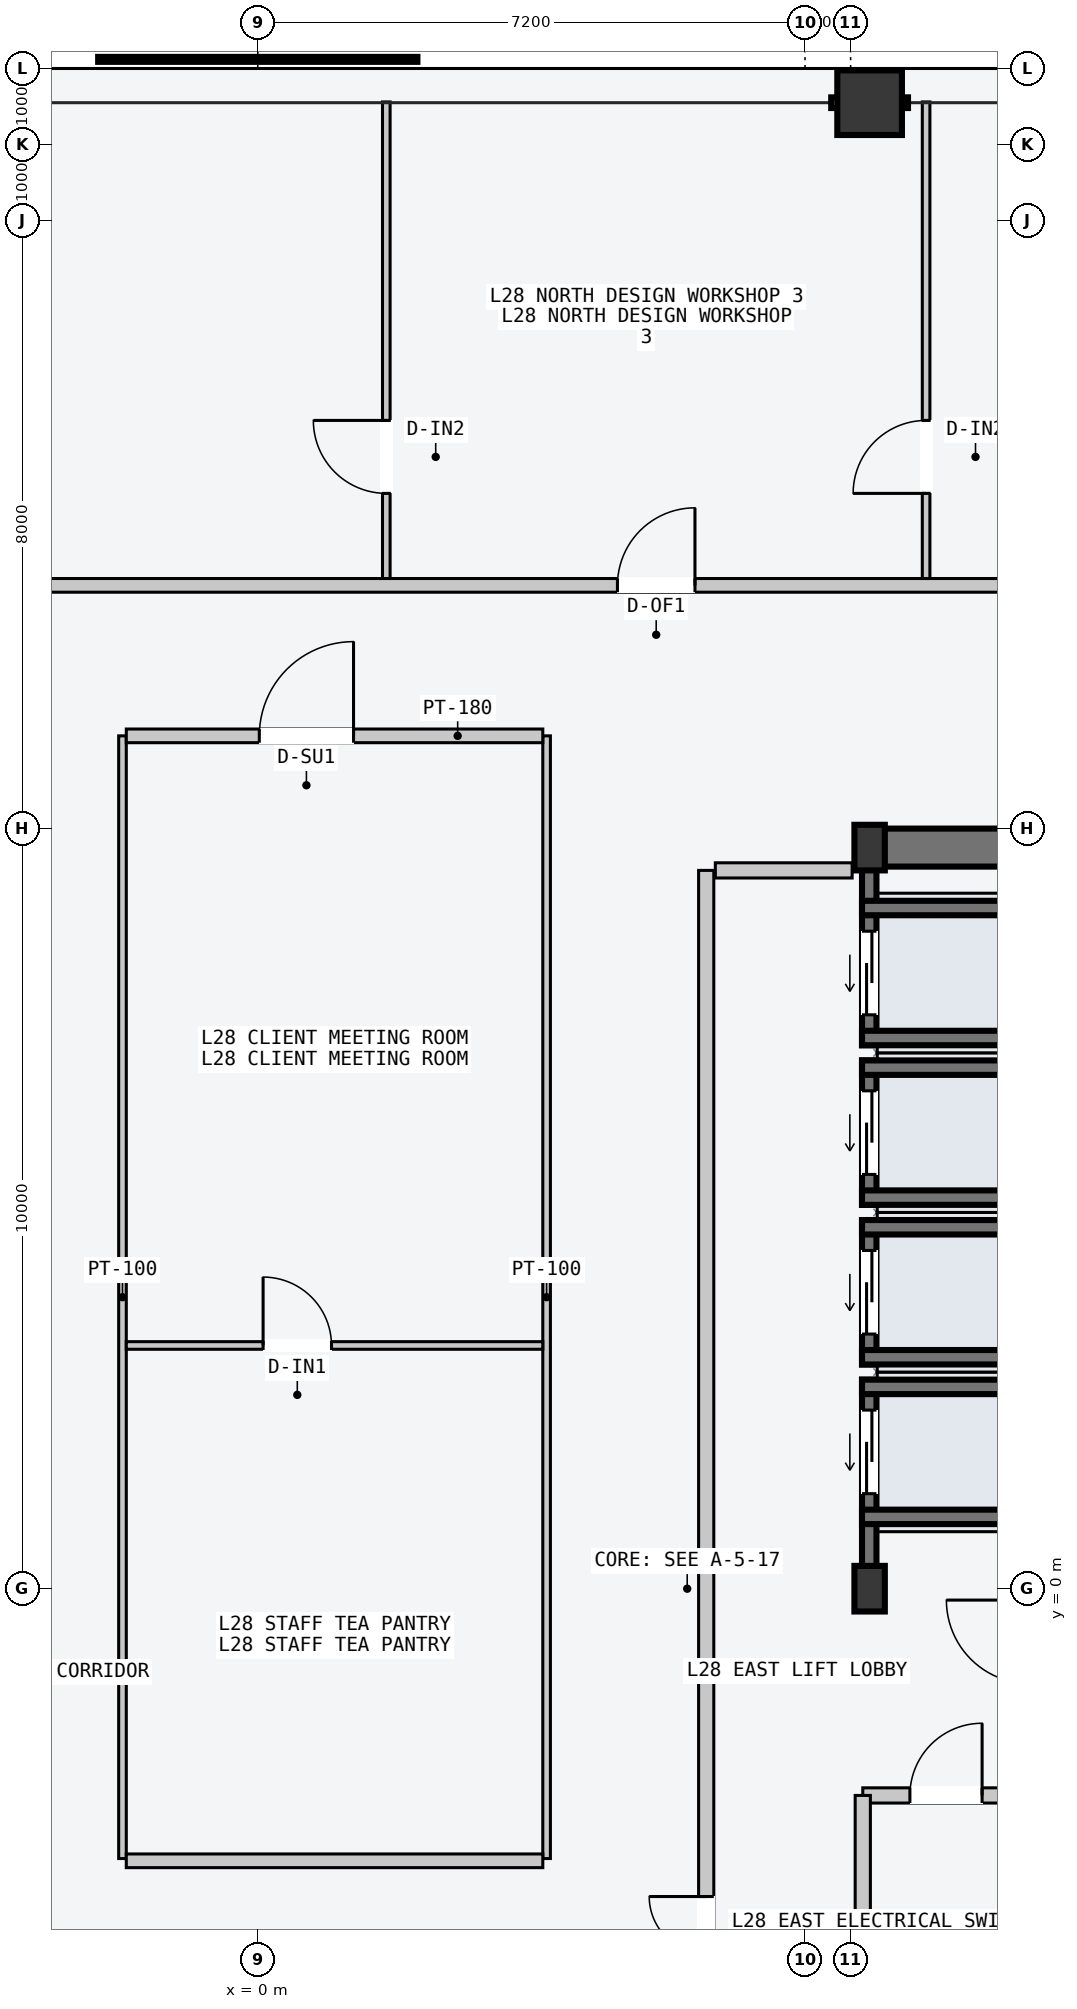
"""IFC4 building model, lengths in metres.
Left out: names, types, materials, properties, quantities, classifications, styles, units other than length and angle.
Written with IfcOpenShell. Run it as: python <this file> out.ifc"""

import sys

from ifc_helpers import new_model, si_unit, direction, frame, frame_2d, origin, origin_2d, place, context, subcontext, project, spatial, rectangle, hollow_rectangle, i_section, extrude, element, fill, save


model = new_model("IFC4")
c1 = context("Model", 3, precision=1e-05, world=origin(), true_north=direction((0.0, 1.0)))
c2 = subcontext(c1, "Body", "Model", "MODEL_VIEW")
j1 = project(units=[si_unit("LENGTHUNIT", "METRE"), si_unit("PLANEANGLEUNIT", "RADIAN")], contexts=[c1])
p1 = place(None, origin())
s1 = spatial("IfcSite", under=j1, at=p1, CompositionType="ELEMENT")
p2 = place(p1, origin())
s2 = spatial("IfcBuilding", under=s1, at=p2, CompositionType="ELEMENT")
p3 = place(p2, frame((0.0, 0.0, 109.8)))
s3 = spatial("IfcBuildingStorey", under=s2, at=p3, CompositionType="ELEMENT", Elevation=109.8)
p4 = place(p3, frame((8.07, 9.75, -0.2), z_axis=(0.0, 0.0, 1.0), x_axis=(1.0, 0.0, 0.0)))
e1 = element("IfcWall", 1, at=p4, inside=s3, PredefinedType="SHEAR", context=c2, shape_type="SweptSolid", body=[
    extrude(rectangle(XDim=6.46, YDim=0.5, at=frame_2d((3.23, 0.0))), origin(), (0.0, 0.0, 1.0), 3.6),
])
for number, where, z_axis, x_axis in (
    (2, (8.05, 0.0, 0.0), (0.0, 0.0, 1.0), (1.0, 0.0, 0.0)),
    (3, (8.05, 9.75, 0.0), (0.0, 0.0, 1.0), (1.0, 0.0, 0.0)),
):
    element("IfcColumn", number, at=place(p3, frame(where, z_axis=z_axis, x_axis=x_axis)), inside=s3, PredefinedType="COLUMN", context=c2, shape_type="SweptSolid", body=[
        extrude(i_section(OverallWidth=0.4, OverallDepth=0.6, WebThickness=0.022, FlangeThickness=0.036, at=origin_2d()), origin(), (0.0, 0.0, 1.0), 3.6),
    ])
p5 = place(p3, frame((8.05, 19.55, 0.0), z_axis=(0.0, 0.0, 1.0), x_axis=(1.0, 0.0, 0.0)))
e4 = element("IfcColumn", 4, at=p5, inside=s3, PredefinedType="COLUMN", context=c2, shape_type="SweptSolid", body=[
    extrude(hollow_rectangle(XDim=0.85, YDim=0.85, WallThickness=0.04, at=origin_2d()), origin(), (0.0, 0.0, 1.0), 3.6),
])
p6 = place(p3, frame((8.045, 0.21, -0.2), z_axis=(0.0, 0.0, 1.0), x_axis=(0.0, 1.0, 0.0)))
e5 = element("IfcWall", 5, at=p6, inside=s3, PredefinedType="SOLIDWALL", context=c2, shape_type="SweptSolid", body=[
    extrude(rectangle(XDim=2.54, YDim=0.19, at=frame_2d((1.27, 0.0))), origin(), (0.0, 0.0, 1.0), 3.6),
])
p7 = place(p6, frame((1.04, 0.0, 0.2)))
e6 = element("IfcOpeningElement", 6, at=p7, cuts=e5, PredefinedType="OPENING", context=c2, shape_type="SweptSolid", body=[
    extrude(rectangle(XDim=1.1, YDim=2.2, at=frame_2d((0.55, 1.1))), frame((0.0, 0.105, 0.0), z_axis=(0.0, -1.0, 0.0), x_axis=(1.0, 0.0, 0.0)), (0.0, 0.0, 1.0), 0.21),
])
for number, where, z_axis, x_axis in (
    (7, (7.95, 2.655, -0.2), (0.0, 0.0, 1.0), (1.0, 0.0, 0.0)),
    (8, (7.95, 0.945, -0.2), (0.0, 0.0, 1.0), (1.0, 0.0, 0.0)),
):
    element("IfcWall", number, at=place(p3, frame(where, z_axis=z_axis, x_axis=x_axis)), inside=s3, PredefinedType="SOLIDWALL", context=c2, shape_type="SweptSolid", body=[
        extrude(rectangle(XDim=2.2, YDim=0.19, at=frame_2d((1.1, 0.0))), origin(), (0.0, 0.0, 1.0), 3.6),
    ])
p8 = place(p3, frame((8.045, 2.95, -0.2), z_axis=(0.0, 0.0, 1.0), x_axis=(0.0, 1.0, 0.0)))
e9 = element("IfcWall", 9, at=p8, inside=s3, PredefinedType="SOLIDWALL", context=c2, shape_type="SweptSolid", body=[
    extrude(rectangle(XDim=1.9, YDim=0.19, at=frame_2d((0.95, 0.0))), origin(), (0.0, 0.0, 1.0), 3.6),
])
p9 = place(p8, frame((0.4, 0.0, 0.2)))
e10 = element("IfcOpeningElement", 10, at=p9, cuts=e9, PredefinedType="OPENING", context=c2, shape_type="SweptSolid", body=[
    extrude(rectangle(XDim=1.1, YDim=2.2, at=frame_2d((0.55, 1.1))), frame((0.0, 0.105, 0.0), z_axis=(0.0, -1.0, 0.0), x_axis=(1.0, 0.0, 0.0)), (0.0, 0.0, 1.0), 0.21),
])
for number, where, z_axis, x_axis in (
    (11, (7.95, 4.755, -0.2), (0.0, 0.0, 1.0), (1.0, 0.0, 0.0)),
    (12, (7.95, 3.045, -0.2), (0.0, 0.0, 1.0), (1.0, 0.0, 0.0)),
):
    element("IfcWall", number, at=place(p3, frame(where, z_axis=z_axis, x_axis=x_axis)), inside=s3, PredefinedType="SOLIDWALL", context=c2, shape_type="SweptSolid", body=[
        extrude(rectangle(XDim=2.2, YDim=0.19, at=frame_2d((1.1, 0.0))), origin(), (0.0, 0.0, 1.0), 3.6),
    ])
p10 = place(p3, frame((8.045, 5.05, -0.2), z_axis=(0.0, 0.0, 1.0), x_axis=(0.0, 1.0, 0.0)))
e13 = element("IfcWall", 13, at=p10, inside=s3, PredefinedType="SOLIDWALL", context=c2, shape_type="SweptSolid", body=[
    extrude(rectangle(XDim=1.9, YDim=0.19, at=frame_2d((0.95, 0.0))), origin(), (0.0, 0.0, 1.0), 3.6),
])
p11 = place(p10, frame((0.4, 0.0, 0.2)))
e14 = element("IfcOpeningElement", 14, at=p11, cuts=e13, PredefinedType="OPENING", context=c2, shape_type="SweptSolid", body=[
    extrude(rectangle(XDim=1.1, YDim=2.2, at=frame_2d((0.55, 1.1))), frame((0.0, 0.105, 0.0), z_axis=(0.0, -1.0, 0.0), x_axis=(1.0, 0.0, 0.0)), (0.0, 0.0, 1.0), 0.21),
])
for number, where, z_axis, x_axis in (
    (15, (7.95, 6.855, -0.2), (0.0, 0.0, 1.0), (1.0, 0.0, 0.0)),
    (16, (7.95, 5.145, -0.2), (0.0, 0.0, 1.0), (1.0, 0.0, 0.0)),
):
    element("IfcWall", number, at=place(p3, frame(where, z_axis=z_axis, x_axis=x_axis)), inside=s3, PredefinedType="SOLIDWALL", context=c2, shape_type="SweptSolid", body=[
        extrude(rectangle(XDim=2.2, YDim=0.19, at=frame_2d((1.1, 0.0))), origin(), (0.0, 0.0, 1.0), 3.6),
    ])
p12 = place(p3, frame((8.045, 7.15, -0.2), z_axis=(0.0, 0.0, 1.0), x_axis=(0.0, 1.0, 0.0)))
e17 = element("IfcWall", 17, at=p12, inside=s3, PredefinedType="SOLIDWALL", context=c2, shape_type="SweptSolid", body=[
    extrude(rectangle(XDim=2.37, YDim=0.19, at=frame_2d((1.185, 0.0))), origin(), (0.0, 0.0, 1.0), 3.6),
])
p13 = place(p12, frame((0.4, 0.0, 0.2)))
e18 = element("IfcOpeningElement", 18, at=p13, cuts=e17, PredefinedType="OPENING", context=c2, shape_type="SweptSolid", body=[
    extrude(rectangle(XDim=1.1, YDim=2.2, at=frame_2d((0.55, 1.1))), frame((0.0, 0.105, 0.0), z_axis=(0.0, -1.0, 0.0), x_axis=(1.0, 0.0, 0.0)), (0.0, 0.0, 1.0), 0.21),
])
for number, where, z_axis, x_axis in (
    (19, (7.95, 8.955, -0.2), (0.0, 0.0, 1.0), (1.0, 0.0, 0.0)),
    (20, (7.95, 7.245, -0.2), (0.0, 0.0, 1.0), (1.0, 0.0, 0.0)),
):
    element("IfcWall", number, at=place(p3, frame(where, z_axis=z_axis, x_axis=x_axis)), inside=s3, PredefinedType="SOLIDWALL", context=c2, shape_type="SweptSolid", body=[
        extrude(rectangle(XDim=2.2, YDim=0.19, at=frame_2d((1.1, 0.0))), origin(), (0.0, 0.0, 1.0), 3.6),
    ])
p14 = place(p3, frame((5.9, -9.45, 0.0), z_axis=(0.0, 0.0, 1.0), x_axis=(0.0, 1.0, 0.0)))
e21 = element("IfcWall", 21, at=p14, inside=s3, PredefinedType="PARTITIONING", context=c2, shape_type="SweptSolid", body=[
    extrude(rectangle(XDim=18.9, YDim=0.2, at=frame_2d((9.45, 0.0))), origin(), (0.0, 0.0, 1.0), 3.4),
])
p15 = place(p14, frame((3.9, 0.0, 0.0)))
e22 = element("IfcOpeningElement", 22, at=p15, cuts=e21, PredefinedType="OPENING", context=c2, shape_type="SweptSolid", body=[
    extrude(rectangle(XDim=1.5, YDim=2.2, at=frame_2d((0.75, 1.1))), frame((0.0, 0.11, 0.0), z_axis=(0.0, -1.0, 0.0), x_axis=(1.0, 0.0, 0.0)), (0.0, 0.0, 1.0), 0.22),
])
p16 = place(p3, frame((6.02, 9.45, 0.0), z_axis=(0.0, 0.0, 1.0), x_axis=(1.0, 0.0, 0.0)))
e23 = element("IfcWall", 23, at=p16, inside=s3, PredefinedType="PARTITIONING", context=c2, shape_type="SweptSolid", body=[
    extrude(rectangle(XDim=1.8, YDim=0.2, at=frame_2d((0.9, 0.0))), origin(), (0.0, 0.0, 1.0), 3.4),
])
p17 = place(p3, frame((7.96, -2.72, 0.0), z_axis=(0.0, 0.0, 1.0), x_axis=(1.0, 0.0, 0.0)))
e24 = element("IfcWall", 24, at=p17, inside=s3, PredefinedType="PARTITIONING", context=c2, shape_type="SweptSolid", body=[
    extrude(rectangle(XDim=2.2, YDim=0.2, at=frame_2d((1.1, 0.0))), origin(), (0.0, 0.0, 1.0), 3.4),
])
p18 = place(p17, frame((0.62, 0.0, 0.0)))
e25 = element("IfcOpeningElement", 25, at=p18, cuts=e24, PredefinedType="OPENING", context=c2, shape_type="SweptSolid", body=[
    extrude(rectangle(XDim=0.95, YDim=2.1, at=frame_2d((0.475, 1.05))), frame((0.0, 0.11, 0.0), z_axis=(0.0, -1.0, 0.0), x_axis=(1.0, 0.0, 0.0)), (0.0, 0.0, 1.0), 0.22),
])
p19 = place(p3, frame((7.96, -5.16, 0.0), z_axis=(0.0, 0.0, 1.0), x_axis=(0.0, 1.0, 0.0)))
e26 = element("IfcWall", 26, at=p19, inside=s3, PredefinedType="PARTITIONING", context=c2, shape_type="SweptSolid", body=[
    extrude(rectangle(XDim=2.44, YDim=0.2, at=frame_2d((1.22, 0.0))), origin(), (0.0, 0.0, 1.0), 3.4),
])
for number, where, z_axis, x_axis in (
    (27, (-1.78, -3.55, 0.0), (0.0, 0.0, 1.0), (0.0, 1.0, 0.0)),
    (28, (3.8, -3.55, 0.0), (0.0, 0.0, 1.0), (0.0, 1.0, 0.0)),
):
    element("IfcWall", number, at=place(p3, frame(where, z_axis=z_axis, x_axis=x_axis)), inside=s3, PredefinedType="PARTITIONING", context=c2, shape_type="SweptSolid", body=[
        extrude(rectangle(XDim=14.77, YDim=0.1, at=frame_2d((7.385, 0.0))), origin(), (0.0, 0.0, 1.0), 3.4),
    ])
p20 = place(p3, frame((-1.73, -3.58, 0.0), z_axis=(0.0, 0.0, 1.0), x_axis=(1.0, 0.0, 0.0)))
e29 = element("IfcWall", 29, at=p20, inside=s3, PredefinedType="PARTITIONING", context=c2, shape_type="SweptSolid", body=[
    extrude(rectangle(XDim=5.48, YDim=0.18, at=frame_2d((2.74, 0.0))), origin(), (0.0, 0.0, 1.0), 3.4),
])
p21 = place(p3, frame((-1.73, 3.2, 0.0), z_axis=(0.0, 0.0, 1.0), x_axis=(1.0, 0.0, 0.0)))
e30 = element("IfcWall", 30, at=p21, inside=s3, PredefinedType="PARTITIONING", context=c2, shape_type="SweptSolid", body=[
    extrude(rectangle(XDim=5.48, YDim=0.1, at=frame_2d((2.74, 0.0))), origin(), (0.0, 0.0, 1.0), 3.4),
])
p22 = place(p21, frame((1.8, 0.0, 0.0)))
e31 = element("IfcOpeningElement", 31, at=p22, cuts=e30, PredefinedType="OPENING", context=c2, shape_type="SweptSolid", body=[
    extrude(rectangle(XDim=0.9, YDim=2.15, at=frame_2d((0.45, 1.075))), frame((0.0, 0.06, 0.0), z_axis=(0.0, -1.0, 0.0), x_axis=(1.0, 0.0, 0.0)), (0.0, 0.0, 1.0), 0.12),
])
p23 = place(p3, frame((-1.73, 11.22, 0.0), z_axis=(0.0, 0.0, 1.0), x_axis=(1.0, 0.0, 0.0)))
e32 = element("IfcWall", 32, at=p23, inside=s3, PredefinedType="PARTITIONING", context=c2, shape_type="SweptSolid", body=[
    extrude(rectangle(XDim=5.48, YDim=0.18, at=frame_2d((2.74, 0.0))), origin(), (0.0, 0.0, 1.0), 3.4),
])
p24 = place(p23, frame((1.75, 0.0, 0.0)))
e33 = element("IfcOpeningElement", 33, at=p24, cuts=e32, PredefinedType="OPENING", context=c2, shape_type="SweptSolid", body=[
    extrude(rectangle(XDim=1.24, YDim=2.24, at=frame_2d((0.62, 1.12))), frame((0.0, 0.1, 0.0), z_axis=(0.0, -1.0, 0.0), x_axis=(1.0, 0.0, 0.0)), (0.0, 0.0, 1.0), 0.2),
])
p25 = place(p3, frame((1.691, 13.26, 0.0), z_axis=(0.0, 0.0, 1.0), x_axis=(0.0, 1.0, 0.0)))
e34 = element("IfcWall", 34, at=p25, inside=s3, PredefinedType="PARTITIONING", context=c2, shape_type="SweptSolid", body=[
    extrude(rectangle(XDim=6.3, YDim=0.1, at=frame_2d((3.15, 0.0))), origin(), (0.0, 0.0, 1.0), 3.4),
])
p26 = place(p25, frame((1.15, 0.0, 0.0)))
e35 = element("IfcOpeningElement", 35, at=p26, cuts=e34, PredefinedType="OPENING", context=c2, shape_type="SweptSolid", body=[
    extrude(rectangle(XDim=0.96, YDim=2.18, at=frame_2d((0.48, 1.09))), frame((0.0, 0.06, 0.0), z_axis=(0.0, -1.0, 0.0), x_axis=(1.0, 0.0, 0.0)), (0.0, 0.0, 1.0), 0.12),
])
p27 = place(p3, frame((8.793, 13.26, 0.0), z_axis=(0.0, 0.0, 1.0), x_axis=(0.0, 1.0, 0.0)))
e36 = element("IfcWall", 36, at=p27, inside=s3, PredefinedType="PARTITIONING", context=c2, shape_type="SweptSolid", body=[
    extrude(rectangle(XDim=6.3, YDim=0.1, at=frame_2d((3.15, 0.0))), origin(), (0.0, 0.0, 1.0), 3.4),
])
p28 = place(p27, frame((1.15, 0.0, 0.0)))
e37 = element("IfcOpeningElement", 37, at=p28, cuts=e36, PredefinedType="OPENING", context=c2, shape_type="SweptSolid", body=[
    extrude(rectangle(XDim=0.96, YDim=2.18, at=frame_2d((0.48, 1.09))), frame((0.0, 0.06, 0.0), z_axis=(0.0, -1.0, 0.0), x_axis=(1.0, 0.0, 0.0)), (0.0, 0.0, 1.0), 0.12),
])
p29 = place(p3, frame((-16.1, 13.2, 0.0), z_axis=(0.0, 0.0, 1.0), x_axis=(1.0, 0.0, 0.0)))
e38 = element("IfcWall", 38, at=p29, inside=s3, PredefinedType="PARTITIONING", context=c2, shape_type="SweptSolid", body=[
    extrude(rectangle(XDim=32.2, YDim=0.18, at=frame_2d((16.1, 0.0))), origin(), (0.0, 0.0, 1.0), 3.4),
])
p30 = place(p29, frame((2.865, 0.0, 0.0)))
e39 = element("IfcOpeningElement", 39, at=p30, cuts=e38, PredefinedType="OPENING", context=c2, shape_type="SweptSolid", body=[
    extrude(rectangle(XDim=0.9, YDim=2.15, at=frame_2d((0.45, 1.075))), frame((0.0, 0.1, 0.0), z_axis=(0.0, -1.0, 0.0), x_axis=(1.0, 0.0, 0.0)), (0.0, 0.0, 1.0), 0.2),
])
p31 = place(p29, frame((11.731, 0.0, 0.0)))
e40 = element("IfcOpeningElement", 40, at=p31, cuts=e38, PredefinedType="OPENING", context=c2, shape_type="SweptSolid", body=[
    extrude(rectangle(XDim=0.96, YDim=2.18, at=frame_2d((0.48, 1.09))), frame((0.0, 0.1, 0.0), z_axis=(0.0, -1.0, 0.0), x_axis=(1.0, 0.0, 0.0)), (0.0, 0.0, 1.0), 0.2),
])
p32 = place(p29, frame((20.832, 0.0, 0.0)))
e41 = element("IfcOpeningElement", 41, at=p32, cuts=e38, PredefinedType="OPENING", context=c2, shape_type="SweptSolid", body=[
    extrude(rectangle(XDim=1.02, YDim=2.2, at=frame_2d((0.51, 1.1))), frame((0.0, 0.1, 0.0), z_axis=(0.0, -1.0, 0.0), x_axis=(1.0, 0.0, 0.0)), (0.0, 0.0, 1.0), 0.2),
])
p33 = place(p29, frame((28.017, 0.0, 0.0)))
e42 = element("IfcOpeningElement", 42, at=p33, cuts=e38, PredefinedType="OPENING", context=c2, shape_type="SweptSolid", body=[
    extrude(rectangle(XDim=1.06, YDim=2.2, at=frame_2d((0.53, 1.1))), frame((0.0, 0.1, 0.0), z_axis=(0.0, -1.0, 0.0), x_axis=(1.0, 0.0, 0.0)), (0.0, 0.0, 1.0), 0.2),
])
p34 = place(p7, origin())
e43 = element("IfcDoor", 43, at=p34, inside=s3, OperationType="SLIDING_TO_LEFT", PredefinedType="DOOR", context=c2, shape_type="SweptSolid", body=[
    extrude(rectangle(XDim=1.1, YDim=2.2, at=frame_2d((0.55, 1.1))), frame((0.0, 0.025, 0.0), z_axis=(0.0, -1.0, 0.0), x_axis=(1.0, 0.0, 0.0)), (0.0, 0.0, 1.0), 0.05),
])
fill(e6, e43)
p35 = place(p9, origin())
e44 = element("IfcDoor", 44, at=p35, inside=s3, OperationType="SLIDING_TO_LEFT", PredefinedType="DOOR", context=c2, shape_type="SweptSolid", body=[
    extrude(rectangle(XDim=1.1, YDim=2.2, at=frame_2d((0.55, 1.1))), frame((0.0, 0.025, 0.0), z_axis=(0.0, -1.0, 0.0), x_axis=(1.0, 0.0, 0.0)), (0.0, 0.0, 1.0), 0.05),
])
fill(e10, e44)
p36 = place(p11, origin())
e45 = element("IfcDoor", 45, at=p36, inside=s3, OperationType="SLIDING_TO_LEFT", PredefinedType="DOOR", context=c2, shape_type="SweptSolid", body=[
    extrude(rectangle(XDim=1.1, YDim=2.2, at=frame_2d((0.55, 1.1))), frame((0.0, 0.025, 0.0), z_axis=(0.0, -1.0, 0.0), x_axis=(1.0, 0.0, 0.0)), (0.0, 0.0, 1.0), 0.05),
])
fill(e14, e45)
p37 = place(p13, origin())
e46 = element("IfcDoor", 46, at=p37, inside=s3, OperationType="SLIDING_TO_LEFT", PredefinedType="DOOR", context=c2, shape_type="SweptSolid", body=[
    extrude(rectangle(XDim=1.1, YDim=2.2, at=frame_2d((0.55, 1.1))), frame((0.0, 0.025, 0.0), z_axis=(0.0, -1.0, 0.0), x_axis=(1.0, 0.0, 0.0)), (0.0, 0.0, 1.0), 0.05),
])
fill(e18, e46)
p38 = place(p15, origin())
e47 = element("IfcDoor", 47, at=p38, inside=s3, OperationType="DOUBLE_DOOR_SINGLE_SWING", PredefinedType="DOOR", context=c2, shape_type="SweptSolid", body=[
    extrude(rectangle(XDim=1.5, YDim=2.2, at=frame_2d((0.75, 1.1))), frame((0.0, 0.025, 0.0), z_axis=(0.0, -1.0, 0.0), x_axis=(1.0, 0.0, 0.0)), (0.0, 0.0, 1.0), 0.05),
])
fill(e22, e47)
p39 = place(p18, origin())
e48 = element("IfcDoor", 48, at=p39, inside=s3, OperationType="SINGLE_SWING_RIGHT", PredefinedType="DOOR", context=c2, shape_type="SweptSolid", body=[
    extrude(rectangle(XDim=0.95, YDim=2.1, at=frame_2d((0.475, 1.05))), frame((0.0, 0.025, 0.0), z_axis=(0.0, -1.0, 0.0), x_axis=(1.0, 0.0, 0.0)), (0.0, 0.0, 1.0), 0.05),
])
fill(e25, e48)
p40 = place(p22, origin())
e49 = element("IfcDoor", 49, at=p40, inside=s3, OperationType="SINGLE_SWING_LEFT", PredefinedType="DOOR", context=c2, shape_type="SweptSolid", body=[
    extrude(rectangle(XDim=0.9, YDim=2.15, at=frame_2d((0.45, 1.075))), frame((0.0, 0.025, 0.0), z_axis=(0.0, -1.0, 0.0), x_axis=(1.0, 0.0, 0.0)), (0.0, 0.0, 1.0), 0.05),
])
fill(e31, e49)
p41 = place(p24, origin())
e50 = element("IfcDoor", 50, at=p41, inside=s3, OperationType="SINGLE_SWING_RIGHT", PredefinedType="DOOR", context=c2, shape_type="SweptSolid", body=[
    extrude(rectangle(XDim=1.24, YDim=2.24, at=frame_2d((0.62, 1.12))), frame((0.0, 0.025, 0.0), z_axis=(0.0, -1.0, 0.0), x_axis=(1.0, 0.0, 0.0)), (0.0, 0.0, 1.0), 0.05),
])
fill(e33, e50)
p42 = place(p26, origin())
e51 = element("IfcDoor", 51, at=p42, inside=s3, OperationType="SINGLE_SWING_RIGHT", PredefinedType="DOOR", context=c2, shape_type="SweptSolid", body=[
    extrude(rectangle(XDim=0.96, YDim=2.18, at=frame_2d((0.48, 1.09))), frame((0.0, 0.025, 0.0), z_axis=(0.0, -1.0, 0.0), x_axis=(1.0, 0.0, 0.0)), (0.0, 0.0, 1.0), 0.05),
])
fill(e35, e51)
p43 = place(p28, origin())
e52 = element("IfcDoor", 52, at=p43, inside=s3, OperationType="SINGLE_SWING_LEFT", PredefinedType="DOOR", context=c2, shape_type="SweptSolid", body=[
    extrude(rectangle(XDim=0.96, YDim=2.18, at=frame_2d((0.48, 1.09))), frame((0.0, 0.025, 0.0), z_axis=(0.0, -1.0, 0.0), x_axis=(1.0, 0.0, 0.0)), (0.0, 0.0, 1.0), 0.05),
])
fill(e37, e52)
p44 = place(p32, origin())
e53 = element("IfcDoor", 53, at=p44, inside=s3, OperationType="SINGLE_SWING_RIGHT", PredefinedType="DOOR", context=c2, shape_type="SweptSolid", body=[
    extrude(rectangle(XDim=1.02, YDim=2.2, at=frame_2d((0.51, 1.1))), frame((0.0, 0.025, 0.0), z_axis=(0.0, -1.0, 0.0), x_axis=(1.0, 0.0, 0.0)), (0.0, 0.0, 1.0), 0.05),
])
fill(e41, e53)
save(model, sys.argv[1])
